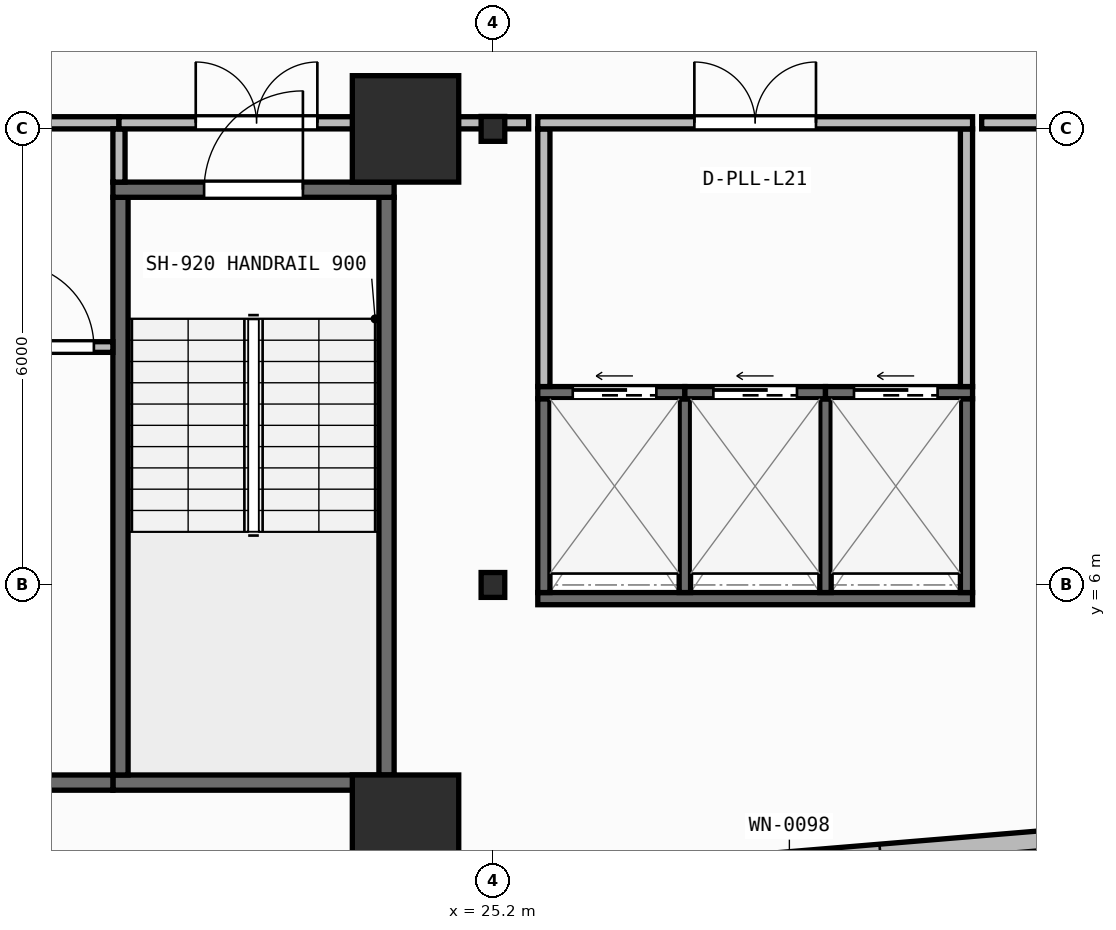
"""IFC4 building model, lengths in metres.
Left out: names, types, materials, properties, quantities, classifications, styles, units other than length and angle.
Written with IfcOpenShell. Run it as: python <this file> out.ifc"""

import sys

from ifc_helpers import new_model, si_unit, direction, frame, frame_2d, origin, origin_2d, place, context, subcontext, project, spatial, rectangle, i_section, extrude, element, fill, save


model = new_model("IFC4")
c1 = context("Model", 3, precision=1e-05, world=origin(), true_north=direction((0.0, 1.0)))
c2 = subcontext(c1, "Body", "Model", "MODEL_VIEW")
j1 = project(units=[si_unit("LENGTHUNIT", "METRE"), si_unit("PLANEANGLEUNIT", "RADIAN")], contexts=[c1])
p1 = place(None, origin())
s1 = spatial("IfcSite", under=j1, at=p1, CompositionType="ELEMENT")
p2 = place(p1, origin())
s2 = spatial("IfcBuilding", under=s1, at=p2, CompositionType="ELEMENT")
p3 = place(p2, frame((0.0, 0.0, 85.7)))
s3 = spatial("IfcBuildingStorey", under=s2, at=p3, CompositionType="ELEMENT", Elevation=85.7)
p4 = place(p3, frame((24.05, 2.8, 0.0), z_axis=(0.0, 0.0, 1.0), x_axis=(1.0, 0.0, 0.0)))
e1 = element("IfcColumn", 1, at=p4, inside=s3, PredefinedType="COLUMN", context=c2, shape_type="SweptSolid", body=[
    extrude(rectangle(XDim=1.4, YDim=1.4, at=origin_2d()), origin(), (0.0, 0.0, 1.0), 3.95),
])
p5 = place(p3, frame((25.2, 6.0, 0.0), z_axis=(0.0, 0.0, 1.0), x_axis=(1.0, 0.0, 0.0)))
e2 = element("IfcColumn", 2, at=p5, inside=s3, PredefinedType="COLUMN", context=c2, shape_type="SweptSolid", body=[
    extrude(i_section(OverallWidth=0.311, OverallDepth=0.327, WebThickness=0.016, FlangeThickness=0.025, FilletRadius=0.017, at=origin_2d()), origin(), (0.0, 0.0, 1.0), 3.95),
])
p6 = place(p3, frame((24.05, 12.0, 0.0), z_axis=(0.0, 0.0, 1.0), x_axis=(1.0, 0.0, 0.0)))
e3 = element("IfcColumn", 3, at=p6, inside=s3, PredefinedType="COLUMN", context=c2, shape_type="SweptSolid", body=[
    extrude(rectangle(XDim=1.4, YDim=1.4, at=origin_2d()), origin(), (0.0, 0.0, 1.0), 3.95),
])
p7 = place(p3, frame((25.2, 12.0, 0.0), z_axis=(0.0, 0.0, 1.0), x_axis=(1.0, 0.0, 0.0)))
e4 = element("IfcColumn", 4, at=p7, inside=s3, PredefinedType="COLUMN", context=c2, shape_type="SweptSolid", body=[
    extrude(i_section(OverallWidth=0.311, OverallDepth=0.327, WebThickness=0.016, FlangeThickness=0.025, FilletRadius=0.017, at=origin_2d()), origin(), (0.0, 0.0, 1.0), 3.95),
])
p8 = place(p3, frame((2.76, 0.174, 0.0), z_axis=(0.0, 0.0, 1.0), x_axis=(0.996571478456, 0.082736257641, 0.0)))
e5 = element("IfcWall", 5, at=p8, inside=s3, PredefinedType="STANDARD", context=c2, shape_type="SweptSolid", body=[
    extrude(rectangle(XDim=52.861, YDim=0.26, at=frame_2d((26.431, 0.0))), origin(), (0.0, 0.0, 1.0), 3.71),
])
p9 = place(p8, frame((25.231, 0.0, 0.9)))
e6 = element("IfcOpeningElement", 6, at=p9, cuts=e5, PredefinedType="OPENING", context=c2, shape_type="SweptSolid", body=[
    extrude(rectangle(XDim=2.4, YDim=1.65, at=frame_2d((1.2, 0.825))), frame((0.0, 0.14, 0.0), z_axis=(0.0, -1.0, 0.0), x_axis=(1.0, 0.0, 0.0)), (0.0, 0.0, 1.0), 0.28),
])
p10 = place(p3, frame((20.2, 3.4, 0.0), z_axis=(0.0, 0.0, 1.0), x_axis=(1.0, 0.0, 0.0)))
e7 = element("IfcWall", 7, at=p10, inside=s3, PredefinedType="SHEAR", context=c2, shape_type="SweptSolid", body=[
    extrude(rectangle(XDim=3.7, YDim=0.2, at=frame_2d((1.85, 0.0))), origin(), (0.0, 0.0, 1.0), 3.71),
])
for number, where, z_axis, x_axis in (
    (8, (20.3, 3.5, 0.0), (0.0, 0.0, 1.0), (0.0, 1.0, 0.0)),
    (9, (23.8, 3.5, 0.0), (0.0, 0.0, 1.0), (0.0, 1.0, 0.0)),
):
    element("IfcWall", number, at=place(p3, frame(where, z_axis=z_axis, x_axis=x_axis)), inside=s3, PredefinedType="SHEAR", context=c2, shape_type="SweptSolid", body=[
        extrude(rectangle(XDim=7.6, YDim=0.2, at=frame_2d((3.8, 0.0))), origin(), (0.0, 0.0, 1.0), 3.71),
    ])
p11 = place(p3, frame((20.2, 11.2, 0.0), z_axis=(0.0, 0.0, 1.0), x_axis=(1.0, 0.0, 0.0)))
e10 = element("IfcWall", 10, at=p11, inside=s3, PredefinedType="SHEAR", context=c2, shape_type="SweptSolid", body=[
    extrude(rectangle(XDim=3.7, YDim=0.2, at=frame_2d((1.85, 0.0))), origin(), (0.0, 0.0, 1.0), 3.71),
])
p12 = place(p11, frame((1.2, 0.0, 0.0)))
e11 = element("IfcOpeningElement", 11, at=p12, cuts=e10, PredefinedType="OPENING", context=c2, shape_type="SweptSolid", body=[
    extrude(rectangle(XDim=1.3, YDim=2.15, at=frame_2d((0.65, 1.075))), frame((0.0, 0.11, 0.0), z_axis=(0.0, -1.0, 0.0), x_axis=(1.0, 0.0, 0.0)), (0.0, 0.0, 1.0), 0.22),
])
p13 = place(p3, frame((6.5, 3.4, 0.0), z_axis=(0.0, 0.0, 1.0), x_axis=(1.0, 0.0, 0.0)))
e12 = element("IfcWall", 12, at=p13, inside=s3, PredefinedType="SHEAR", context=c2, shape_type="SweptSolid", body=[
    extrude(rectangle(XDim=13.7, YDim=0.2, at=frame_2d((6.85, 0.0))), origin(), (0.0, 0.0, 1.0), 3.71),
])
p14 = place(p3, frame((25.79, 5.82, 0.0), z_axis=(0.0, 0.0, 1.0), x_axis=(1.0, 0.0, 0.0)))
e13 = element("IfcWall", 13, at=p14, inside=s3, PredefinedType="SHEAR", context=c2, shape_type="SweptSolid", body=[
    extrude(rectangle(XDim=5.72, YDim=0.16, at=frame_2d((2.86, 0.0))), origin(), (0.0, 0.0, 1.0), 3.71),
])
for number, where, z_axis, x_axis in (
    (14, (25.87, 5.9, 0.0), (0.0, 0.0, 1.0), (0.0, 1.0, 0.0)),
    (15, (31.43, 5.9, 0.0), (0.0, 0.0, 1.0), (0.0, 1.0, 0.0)),
):
    element("IfcWall", number, at=place(p3, frame(where, z_axis=z_axis, x_axis=x_axis)), inside=s3, PredefinedType="SHEAR", context=c2, shape_type="SweptSolid", body=[
        extrude(rectangle(XDim=2.55, YDim=0.16, at=frame_2d((1.275, 0.0))), origin(), (0.0, 0.0, 1.0), 3.71),
    ])
for number, where, z_axis, x_axis in (
    (16, (27.725, 5.9, 0.0), (0.0, 0.0, 1.0), (0.0, 1.0, 0.0)),
    (17, (29.575, 5.9, 0.0), (0.0, 0.0, 1.0), (0.0, 1.0, 0.0)),
):
    element("IfcWall", number, at=place(p3, frame(where, z_axis=z_axis, x_axis=x_axis)), inside=s3, PredefinedType="SHEAR", context=c2, shape_type="SweptSolid", body=[
        extrude(rectangle(XDim=2.55, YDim=0.15, at=frame_2d((1.275, 0.0))), origin(), (0.0, 0.0, 1.0), 3.71),
    ])
p15 = place(p3, frame((25.79, 8.53, 0.0), z_axis=(0.0, 0.0, 1.0), x_axis=(1.0, 0.0, 0.0)))
e18 = element("IfcWall", 18, at=p15, inside=s3, PredefinedType="SHEAR", context=c2, shape_type="SweptSolid", body=[
    extrude(rectangle(XDim=1.935, YDim=0.16, at=frame_2d((0.968, 0.0))), origin(), (0.0, 0.0, 1.0), 3.71),
])
p16 = place(p15, frame((0.46, 0.0, 0.0)))
e19 = element("IfcOpeningElement", 19, at=p16, cuts=e18, PredefinedType="OPENING", context=c2, shape_type="SweptSolid", body=[
    extrude(rectangle(XDim=1.1, YDim=2.15, at=frame_2d((0.55, 1.075))), frame((0.0, 0.09, 0.0), z_axis=(0.0, -1.0, 0.0), x_axis=(1.0, 0.0, 0.0)), (0.0, 0.0, 1.0), 0.18),
])
p17 = place(p3, frame((27.725, 8.53, 0.0), z_axis=(0.0, 0.0, 1.0), x_axis=(1.0, 0.0, 0.0)))
e20 = element("IfcWall", 20, at=p17, inside=s3, PredefinedType="SHEAR", context=c2, shape_type="SweptSolid", body=[
    extrude(rectangle(XDim=1.85, YDim=0.16, at=frame_2d((0.925, 0.0))), origin(), (0.0, 0.0, 1.0), 3.71),
])
p18 = place(p17, frame((0.375, 0.0, 0.0)))
e21 = element("IfcOpeningElement", 21, at=p18, cuts=e20, PredefinedType="OPENING", context=c2, shape_type="SweptSolid", body=[
    extrude(rectangle(XDim=1.1, YDim=2.15, at=frame_2d((0.55, 1.075))), frame((0.0, 0.09, 0.0), z_axis=(0.0, -1.0, 0.0), x_axis=(1.0, 0.0, 0.0)), (0.0, 0.0, 1.0), 0.18),
])
p19 = place(p3, frame((29.575, 8.53, 0.0), z_axis=(0.0, 0.0, 1.0), x_axis=(1.0, 0.0, 0.0)))
e22 = element("IfcWall", 22, at=p19, inside=s3, PredefinedType="SHEAR", context=c2, shape_type="SweptSolid", body=[
    extrude(rectangle(XDim=1.935, YDim=0.16, at=frame_2d((0.968, 0.0))), origin(), (0.0, 0.0, 1.0), 3.71),
])
p20 = place(p19, frame((0.375, 0.0, 0.0)))
e23 = element("IfcOpeningElement", 23, at=p20, cuts=e22, PredefinedType="OPENING", context=c2, shape_type="SweptSolid", body=[
    extrude(rectangle(XDim=1.1, YDim=2.15, at=frame_2d((0.55, 1.075))), frame((0.0, 0.09, 0.0), z_axis=(0.0, -1.0, 0.0), x_axis=(1.0, 0.0, 0.0)), (0.0, 0.0, 1.0), 0.18),
])
p21 = place(p3, frame((18.61, 9.13, 0.0), z_axis=(0.0, 0.0, 1.0), x_axis=(1.0, 0.0, 0.0)))
e24 = element("IfcWall", 24, at=p21, inside=s3, PredefinedType="PARTITIONING", context=c2, shape_type="SweptSolid", body=[
    extrude(rectangle(XDim=1.59, YDim=0.14, at=frame_2d((0.795, 0.0))), origin(), (0.0, 0.0, 1.0), 3.71),
])
p22 = place(p21, frame((0.24, 0.0, 0.0)))
e25 = element("IfcOpeningElement", 25, at=p22, cuts=e24, PredefinedType="OPENING", context=c2, shape_type="SweptSolid", body=[
    extrude(rectangle(XDim=1.1, YDim=2.1, at=frame_2d((0.55, 1.05))), frame((0.0, 0.08, 0.0), z_axis=(0.0, -1.0, 0.0), x_axis=(1.0, 0.0, 0.0)), (0.0, 0.0, 1.0), 0.16),
])
p23 = place(p3, frame((12.58, 12.08, 0.0), z_axis=(0.0, 0.0, 1.0), x_axis=(1.0, 0.0, 0.0)))
e26 = element("IfcWall", 26, at=p23, inside=s3, PredefinedType="PARTITIONING", context=c2, shape_type="SweptSolid", body=[
    extrude(rectangle(XDim=7.7, YDim=0.16, at=frame_2d((3.85, 0.0))), origin(), (0.0, 0.0, 1.0), 3.073),
])
p24 = place(p23, frame((3.05, 0.0, 0.0)))
e27 = element("IfcOpeningElement", 27, at=p24, cuts=e26, PredefinedType="OPENING", context=c2, shape_type="SweptSolid", body=[
    extrude(rectangle(XDim=1.6, YDim=2.05, at=frame_2d((0.8, 1.025))), frame((0.0, 0.09, 0.0), z_axis=(0.0, -1.0, 0.0), x_axis=(1.0, 0.0, 0.0)), (0.0, 0.0, 1.0), 0.18),
])
p25 = place(p3, frame((20.28, 11.3, 0.0), z_axis=(0.0, 0.0, 1.0), x_axis=(0.0, 1.0, 0.0)))
e28 = element("IfcWall", 28, at=p25, inside=s3, PredefinedType="PARTITIONING", context=c2, shape_type="SweptSolid", body=[
    extrude(rectangle(XDim=0.7, YDim=0.16, at=frame_2d((0.35, 0.0))), origin(), (0.0, 0.0, 1.0), 3.71),
])
p26 = place(p3, frame((20.28, 12.08, 0.0), z_axis=(0.0, 0.0, 1.0), x_axis=(1.0, 0.0, 0.0)))
e29 = element("IfcWall", 29, at=p26, inside=s3, PredefinedType="PARTITIONING", context=c2, shape_type="SweptSolid", body=[
    extrude(rectangle(XDim=3.62, YDim=0.16, at=frame_2d((1.81, 0.0))), origin(), (0.0, 0.0, 1.0), 3.073),
])
p27 = place(p26, frame((1.01, 0.0, 0.0)))
e30 = element("IfcOpeningElement", 30, at=p27, cuts=e29, PredefinedType="OPENING", context=c2, shape_type="SweptSolid", body=[
    extrude(rectangle(XDim=1.6, YDim=2.05, at=frame_2d((0.8, 1.025))), frame((0.0, 0.09, 0.0), z_axis=(0.0, -1.0, 0.0), x_axis=(1.0, 0.0, 0.0)), (0.0, 0.0, 1.0), 0.18),
])
p28 = place(p3, frame((23.82, 11.3, 0.0), z_axis=(0.0, 0.0, 1.0), x_axis=(0.0, 1.0, 0.0)))
e31 = element("IfcWall", 31, at=p28, inside=s3, PredefinedType="PARTITIONING", context=c2, shape_type="SweptSolid", body=[
    extrude(rectangle(XDim=0.7, YDim=0.16, at=frame_2d((0.35, 0.0))), origin(), (0.0, 0.0, 1.0), 3.71),
])
for number, where, z_axis, x_axis in (
    (32, (25.87, 8.61, 0.0), (0.0, 0.0, 1.0), (0.0, 1.0, 0.0)),
    (33, (31.43, 8.61, 0.0), (0.0, 0.0, 1.0), (0.0, 1.0, 0.0)),
):
    element("IfcWall", number, at=place(p3, frame(where, z_axis=z_axis, x_axis=x_axis)), inside=s3, PredefinedType="PARTITIONING", context=c2, shape_type="SweptSolid", body=[
        extrude(rectangle(XDim=3.39, YDim=0.16, at=frame_2d((1.695, 0.0))), origin(), (0.0, 0.0, 1.0), 3.71),
    ])
p29 = place(p3, frame((25.79, 12.08, 0.0), z_axis=(0.0, 0.0, 1.0), x_axis=(1.0, 0.0, 0.0)))
e34 = element("IfcWall", 34, at=p29, inside=s3, PredefinedType="PARTITIONING", context=c2, shape_type="SweptSolid", body=[
    extrude(rectangle(XDim=5.72, YDim=0.16, at=frame_2d((2.86, 0.0))), origin(), (0.0, 0.0, 1.0), 3.073),
])
p30 = place(p29, frame((2.06, 0.0, 0.0)))
e35 = element("IfcOpeningElement", 35, at=p30, cuts=e34, PredefinedType="OPENING", context=c2, shape_type="SweptSolid", body=[
    extrude(rectangle(XDim=1.6, YDim=2.05, at=frame_2d((0.8, 1.025))), frame((0.0, 0.09, 0.0), z_axis=(0.0, -1.0, 0.0), x_axis=(1.0, 0.0, 0.0)), (0.0, 0.0, 1.0), 0.18),
])
p31 = place(p3, frame((24.02, 12.08, 0.0), z_axis=(0.0, 0.0, 1.0), x_axis=(1.0, 0.0, 0.0)))
e36 = element("IfcWall", 36, at=p31, inside=s3, PredefinedType="PARTITIONING", context=c2, shape_type="SweptSolid", body=[
    extrude(rectangle(XDim=1.65, YDim=0.16, at=frame_2d((0.825, 0.0))), origin(), (0.0, 0.0, 1.0), 3.073),
])
p32 = place(p3, frame((31.63, 12.08, 0.0), z_axis=(0.0, 0.0, 1.0), x_axis=(1.0, 0.0, 0.0)))
e37 = element("IfcWall", 37, at=p32, inside=s3, PredefinedType="PARTITIONING", context=c2, shape_type="SweptSolid", body=[
    extrude(rectangle(XDim=11.181, YDim=0.16, at=frame_2d((5.59, 0.0))), origin(), (0.0, 0.0, 1.0), 3.073),
])
p33 = place(p12, origin())
e38 = element("IfcDoor", 38, at=p33, inside=s3, OperationType="SINGLE_SWING_RIGHT", PredefinedType="DOOR", context=c2, shape_type="SweptSolid", body=[
    extrude(rectangle(XDim=1.3, YDim=2.15, at=frame_2d((0.65, 1.075))), frame((0.0, 0.025, 0.0), z_axis=(0.0, -1.0, 0.0), x_axis=(1.0, 0.0, 0.0)), (0.0, 0.0, 1.0), 0.05),
])
fill(e11, e38)
p34 = place(p16, origin())
e39 = element("IfcDoor", 39, at=p34, inside=s3, OperationType="SLIDING_TO_LEFT", PredefinedType="DOOR", context=c2, shape_type="SweptSolid", body=[
    extrude(rectangle(XDim=1.1, YDim=2.15, at=frame_2d((0.55, 1.075))), frame((0.0, 0.025, 0.0), z_axis=(0.0, -1.0, 0.0), x_axis=(1.0, 0.0, 0.0)), (0.0, 0.0, 1.0), 0.05),
])
fill(e19, e39)
p35 = place(p18, origin())
e40 = element("IfcDoor", 40, at=p35, inside=s3, OperationType="SLIDING_TO_LEFT", PredefinedType="DOOR", context=c2, shape_type="SweptSolid", body=[
    extrude(rectangle(XDim=1.1, YDim=2.15, at=frame_2d((0.55, 1.075))), frame((0.0, 0.025, 0.0), z_axis=(0.0, -1.0, 0.0), x_axis=(1.0, 0.0, 0.0)), (0.0, 0.0, 1.0), 0.05),
])
fill(e21, e40)
p36 = place(p20, origin())
e41 = element("IfcDoor", 41, at=p36, inside=s3, OperationType="SLIDING_TO_LEFT", PredefinedType="DOOR", context=c2, shape_type="SweptSolid", body=[
    extrude(rectangle(XDim=1.1, YDim=2.15, at=frame_2d((0.55, 1.075))), frame((0.0, 0.025, 0.0), z_axis=(0.0, -1.0, 0.0), x_axis=(1.0, 0.0, 0.0)), (0.0, 0.0, 1.0), 0.05),
])
fill(e23, e41)
p37 = place(p22, origin())
e42 = element("IfcDoor", 42, at=p37, inside=s3, OperationType="SINGLE_SWING_LEFT", PredefinedType="DOOR", context=c2, shape_type="SweptSolid", body=[
    extrude(rectangle(XDim=1.1, YDim=2.1, at=frame_2d((0.55, 1.05))), frame((0.0, 0.025, 0.0), z_axis=(0.0, -1.0, 0.0), x_axis=(1.0, 0.0, 0.0)), (0.0, 0.0, 1.0), 0.05),
])
fill(e25, e42)
p38 = place(p27, origin())
e43 = element("IfcDoor", 43, at=p38, inside=s3, OperationType="DOUBLE_DOOR_SINGLE_SWING", PredefinedType="DOOR", context=c2, shape_type="SweptSolid", body=[
    extrude(rectangle(XDim=1.6, YDim=2.05, at=frame_2d((0.8, 1.025))), frame((0.0, 0.025, 0.0), z_axis=(0.0, -1.0, 0.0), x_axis=(1.0, 0.0, 0.0)), (0.0, 0.0, 1.0), 0.05),
])
fill(e30, e43)
p39 = place(p30, origin())
e44 = element("IfcDoor", 44, at=p39, inside=s3, OperationType="DOUBLE_DOOR_SINGLE_SWING", PredefinedType="DOOR", context=c2, shape_type="SweptSolid", body=[
    extrude(rectangle(XDim=1.6, YDim=2.05, at=frame_2d((0.8, 1.025))), frame((0.0, 0.025, 0.0), z_axis=(0.0, -1.0, 0.0), x_axis=(1.0, 0.0, 0.0)), (0.0, 0.0, 1.0), 0.05),
])
fill(e35, e44)
save(model, sys.argv[1])
